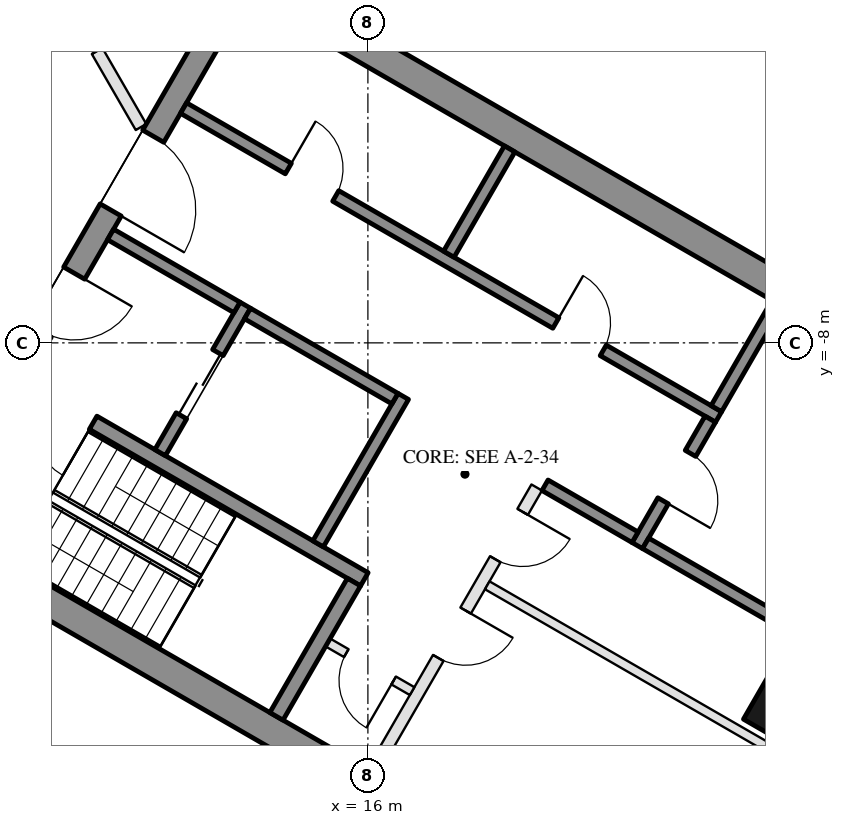
"""IFC4 building model, lengths in metres.
Left out: names, types, materials, properties, quantities, classifications, styles, units other than length and angle.
Written with IfcOpenShell. Run it as: python <this file> out.ifc"""

import sys

from ifc_helpers import new_model, si_unit, direction, frame, frame_2d, origin, origin_2d, place, context, subcontext, project, spatial, rectangle, hollow_rectangle, extrude, element, fill, save


model = new_model("IFC4")
c1 = context("Model", 3, precision=1e-05, world=origin(), true_north=direction((0.0, 1.0)))
c2 = subcontext(c1, "Body", "Model", "MODEL_VIEW")
j1 = project(units=[si_unit("LENGTHUNIT", "METRE"), si_unit("PLANEANGLEUNIT", "RADIAN")], contexts=[c1])
p1 = place(None, origin())
s1 = spatial("IfcSite", under=j1, at=p1, CompositionType="ELEMENT")
p2 = place(p1, origin())
s2 = spatial("IfcBuilding", under=s1, at=p2, CompositionType="ELEMENT")
p3 = place(p2, frame((0.0, 0.0, 150.3)))
s3 = spatial("IfcBuildingStorey", under=s2, at=p3, CompositionType="ELEMENT", Elevation=150.3)
p4 = place(p3, frame((23.729, -13.7, 0.0), z_axis=(0.0, 0.0, 1.0), x_axis=(0.5, 0.866025403784, 0.0)))
e1 = element("IfcColumn", 1, at=p4, inside=s3, PredefinedType="COLUMN", context=c2, shape_type="SweptSolid", body=[
    extrude(hollow_rectangle(XDim=2.4, YDim=2.2, WallThickness=0.06, at=origin_2d()), origin(), (0.0, 0.0, 1.0), 3.7),
])
p5 = place(p3, frame((26.257, -6.567, 0.0), z_axis=(0.0, 0.0, 1.0), x_axis=(-0.500023526245, 0.866011820475, 0.0)))
e2 = element("IfcWall", 2, at=p5, inside=s3, PredefinedType="SOLIDWALL", context=c2, shape_type="SweptSolid", body=[
    extrude(rectangle(XDim=11.816, YDim=0.35, at=frame_2d((5.908, 0.0))), origin(), (0.0, 0.0, 1.0), 3.55),
])
p6 = place(p5, frame((0.38, 0.0, 0.3)))
e3 = element("IfcOpeningElement", 3, at=p6, cuts=e2, PredefinedType="OPENING", context=c2, shape_type="SweptSolid", body=[
    extrude(rectangle(XDim=1.8, YDim=2.65, at=frame_2d((0.9, 1.325))), frame((0.0, 0.185, 0.0), z_axis=(0.0, -1.0, 0.0), x_axis=(1.0, 0.0, 0.0)), (0.0, 0.0, 1.0), 0.37),
])
p7 = place(p5, frame((7.741, 0.0, 0.0)))
e4 = element("IfcOpeningElement", 4, at=p7, cuts=e2, PredefinedType="OPENING", context=c2, shape_type="SweptSolid", body=[
    extrude(rectangle(XDim=2.4, YDim=2.4, at=frame_2d((1.2, 1.2))), frame((0.0, 0.185, 0.0), z_axis=(0.0, -1.0, 0.0), x_axis=(1.0, 0.0, 0.0)), (0.0, 0.0, 1.0), 0.37),
])
p8 = place(p5, frame((3.791, 0.0, 0.3)))
e5 = element("IfcOpeningElement", 5, at=p8, cuts=e2, PredefinedType="OPENING", context=c2, shape_type="SweptSolid", body=[
    extrude(rectangle(XDim=1.6, YDim=2.65, at=frame_2d((0.8, 1.325))), frame((0.0, 0.185, 0.0), z_axis=(0.0, -1.0, 0.0), x_axis=(1.0, 0.0, 0.0)), (0.0, 0.0, 1.0), 0.37),
])
p9 = place(p5, frame((5.691, 0.0, 0.3)))
e6 = element("IfcOpeningElement", 6, at=p9, cuts=e2, PredefinedType="OPENING", context=c2, shape_type="SweptSolid", body=[
    extrude(rectangle(XDim=1.6, YDim=2.65, at=frame_2d((0.8, 1.325))), frame((0.0, 0.185, 0.0), z_axis=(0.0, -1.0, 0.0), x_axis=(1.0, 0.0, 0.0)), (0.0, 0.0, 1.0), 0.37),
])
for number, where, z_axis, x_axis in (
    (7, (8.547, -10.997, 0.0), (0.0, 0.0, 1.0), (0.866, -0.5, 0.0)),
    (8, (13.797, -1.903, 0.0), (0.0, 0.0, 1.0), (0.866, -0.5, 0.0)),
):
    element("IfcWall", number, at=place(p3, frame(where, z_axis=z_axis, x_axis=x_axis)), inside=s3, PredefinedType="SHEAR", context=c2, shape_type="SweptSolid", body=[
        extrude(rectangle(XDim=14.837, YDim=0.5, at=frame_2d((7.418, 0.0))), origin(), (0.0, 0.0, 1.0), 3.5),
    ])
p10 = place(p3, frame((8.845, -10.88, 0.0), z_axis=(0.0, 0.0, 1.0), x_axis=(0.500004234368, 0.866022959057, 0.0)))
e9 = element("IfcWall", 9, at=p10, inside=s3, PredefinedType="SHEAR", context=c2, shape_type="SweptSolid", body=[
    extrude(rectangle(XDim=10.0, YDim=0.4, at=frame_2d((5.0, 0.0))), origin(), (0.0, 0.0, 1.0), 3.5),
])
p11 = place(p10, frame((3.55, 0.0, 0.0)))
e10 = element("IfcOpeningElement", 10, at=p11, cuts=e9, PredefinedType="OPENING", context=c2, shape_type="SweptSolid", body=[
    extrude(rectangle(XDim=1.1, YDim=2.1, at=frame_2d((0.55, 1.05))), frame((0.0, 0.21, 0.0), z_axis=(0.0, -1.0, 0.0), x_axis=(1.0, 0.0, 0.0)), (0.0, 0.0, 1.0), 0.42),
])
p12 = place(p10, frame((5.85, 0.0, 0.0)))
e11 = element("IfcOpeningElement", 11, at=p12, cuts=e9, PredefinedType="OPENING", context=c2, shape_type="SweptSolid", body=[
    extrude(rectangle(XDim=1.4, YDim=2.1, at=frame_2d((0.7, 1.05))), frame((0.0, 0.21, 0.0), z_axis=(0.0, -1.0, 0.0), x_axis=(1.0, 0.0, 0.0)), (0.0, 0.0, 1.0), 0.42),
])
p13 = place(p3, frame((10.356, -8.664, 0.0), z_axis=(0.0, 0.0, 1.0), x_axis=(0.866028629588, -0.499994412703, 0.0)))
e12 = element("IfcWall", 12, at=p13, inside=s3, PredefinedType="SHEAR", context=c2, shape_type="SweptSolid", body=[
    extrude(rectangle(XDim=6.45, YDim=0.25, at=frame_2d((3.225, 0.0))), origin(), (0.0, 0.0, 1.0), 3.5),
])
p14 = place(p13, frame((0.3, 0.0, 0.0)))
e13 = element("IfcOpeningElement", 13, at=p14, cuts=e12, PredefinedType="OPENING", context=c2, shape_type="SweptSolid", body=[
    extrude(rectangle(XDim=1.0, YDim=2.1, at=frame_2d((0.5, 1.05))), frame((0.0, 0.135, 0.0), z_axis=(0.0, -1.0, 0.0), x_axis=(1.0, 0.0, 0.0)), (0.0, 0.0, 1.0), 0.27),
])
p15 = place(p3, frame((14.496, -14.143, 0.0), z_axis=(0.0, 0.0, 1.0), x_axis=(0.500062241894, 0.865989465428, 0.0)))
e14 = element("IfcWall", 14, at=p15, inside=s3, PredefinedType="SHEAR", context=c2, shape_type="SweptSolid", body=[
    extrude(rectangle(XDim=2.55, YDim=0.25, at=frame_2d((1.275, 0.0))), origin(), (0.0, 0.0, 1.0), 3.5),
])
p16 = place(p3, frame((15.181, -11.305, 0.0), z_axis=(0.0, 0.0, 1.0), x_axis=(0.49994636267, 0.866056369097, 0.0)))
e15 = element("IfcWall", 15, at=p16, inside=s3, PredefinedType="SHEAR", context=c2, shape_type="SweptSolid", body=[
    extrude(rectangle(XDim=2.8, YDim=0.2, at=frame_2d((1.4, 0.0))), origin(), (0.0, 0.0, 1.0), 3.5),
])
p17 = place(p3, frame((12.583, -9.805, 0.0), z_axis=(0.0, 0.0, 1.0), x_axis=(0.49994636267, 0.866056369097, 0.0)))
e16 = element("IfcWall", 16, at=p17, inside=s3, PredefinedType="SHEAR", context=c2, shape_type="SweptSolid", body=[
    extrude(rectangle(XDim=2.8, YDim=0.2, at=frame_2d((1.4, 0.0))), origin(), (0.0, 0.0, 1.0), 3.5),
])
p18 = place(p17, frame((0.7, 0.0, 0.0)))
e17 = element("IfcOpeningElement", 17, at=p18, cuts=e16, PredefinedType="OPENING", context=c2, shape_type="SweptSolid", body=[
    extrude(rectangle(XDim=1.2, YDim=2.1, at=frame_2d((0.6, 1.05))), frame((0.0, 0.11, 0.0), z_axis=(0.0, -1.0, 0.0), x_axis=(1.0, 0.0, 0.0)), (0.0, 0.0, 1.0), 0.22),
])
p19 = place(p3, frame((11.768, -6.217, 0.0), z_axis=(0.0, 0.0, 1.0), x_axis=(0.866050077142, -0.499957262057, 0.0)))
e18 = element("IfcWall", 18, at=p19, inside=s3, PredefinedType="SHEAR", context=c2, shape_type="SweptSolid", body=[
    extrude(rectangle(XDim=2.4, YDim=0.2, at=frame_2d((1.2, 0.0))), origin(), (0.0, 0.0, 1.0), 3.5),
])
p20 = place(p3, frame((14.02, -7.517, 0.0), z_axis=(0.0, 0.0, 1.0), x_axis=(0.866034573852, -0.49998411664, 0.0)))
e19 = element("IfcWall", 19, at=p20, inside=s3, PredefinedType="SHEAR", context=c2, shape_type="SweptSolid", body=[
    extrude(rectangle(XDim=2.8, YDim=0.2, at=frame_2d((1.4, 0.0))), origin(), (0.0, 0.0, 1.0), 3.5),
])
p21 = place(p3, frame((12.968, -4.138, 0.0), z_axis=(0.0, 0.0, 1.0), x_axis=(0.866028328073, -0.49999493495, 0.0)))
e20 = element("IfcWall", 20, at=p21, inside=s3, PredefinedType="SHEAR", context=c2, shape_type="SweptSolid", body=[
    extrude(rectangle(XDim=10.16, YDim=0.2, at=frame_2d((5.08, 0.0))), origin(), (0.0, 0.0, 1.0), 3.5),
])
p22 = place(p21, frame((1.99, 0.0, 0.0)))
e21 = element("IfcOpeningElement", 21, at=p22, cuts=e20, PredefinedType="OPENING", context=c2, shape_type="SweptSolid", body=[
    extrude(rectangle(XDim=0.9, YDim=2.1, at=frame_2d((0.45, 1.05))), frame((0.0, 0.11, 0.0), z_axis=(0.0, -1.0, 0.0), x_axis=(1.0, 0.0, 0.0)), (0.0, 0.0, 1.0), 0.22),
])
p23 = place(p21, frame((7.07, 0.0, 0.0)))
e22 = element("IfcOpeningElement", 22, at=p23, cuts=e20, PredefinedType="OPENING", context=c2, shape_type="SweptSolid", body=[
    extrude(rectangle(XDim=0.9, YDim=2.1, at=frame_2d((0.45, 1.05))), frame((0.0, 0.11, 0.0), z_axis=(0.0, -1.0, 0.0), x_axis=(1.0, 0.0, 0.0)), (0.0, 0.0, 1.0), 0.22),
])
p24 = place(p3, frame((20.43, -11.333, 0.0), z_axis=(0.0, 0.0, 1.0), x_axis=(0.500001309137, 0.866024647952, 0.0)))
e23 = element("IfcWall", 23, at=p24, inside=s3, PredefinedType="SHEAR", context=c2, shape_type="SweptSolid", body=[
    extrude(rectangle(XDim=2.4, YDim=0.2, at=frame_2d((1.2, 0.0))), origin(), (0.0, 0.0, 1.0), 3.5),
])
p25 = place(p24, frame((0.85, 0.0, 0.0)))
e24 = element("IfcOpeningElement", 24, at=p25, cuts=e23, PredefinedType="OPENING", context=c2, shape_type="SweptSolid", body=[
    extrude(rectangle(XDim=0.9, YDim=2.1, at=frame_2d((0.45, 1.05))), frame((0.0, 0.11, 0.0), z_axis=(0.0, -1.0, 0.0), x_axis=(1.0, 0.0, 0.0)), (0.0, 0.0, 1.0), 0.22),
])
p26 = place(p3, frame((18.913, -10.342, 0.0), z_axis=(0.0, 0.0, 1.0), x_axis=(0.866038183914, -0.499977863513, 0.0)))
e25 = element("IfcWall", 25, at=p26, inside=s3, PredefinedType="SHEAR", context=c2, shape_type="SweptSolid", body=[
    extrude(rectangle(XDim=1.71, YDim=0.2, at=frame_2d((0.855, 0.0))), origin(), (0.0, 0.0, 1.0), 3.5),
])
for number, where, z_axis, x_axis in (
    (26, (17.331, -6.542, 0.0), (0.0, 0.0, 1.0), (0.5, 0.866, 0.0)),
    (27, (21.73, -9.082, 0.0), (0.0, 0.0, 1.0), (0.5, 0.866, 0.0)),
):
    element("IfcWall", number, at=place(p3, frame(where, z_axis=z_axis, x_axis=x_axis)), inside=s3, PredefinedType="SHEAR", context=c2, shape_type="SweptSolid", body=[
        extrude(rectangle(XDim=2.0, YDim=0.2, at=frame_2d((1.0, 0.0))), origin(), (0.0, 0.0, 1.0), 3.5),
    ])
p27 = place(p3, frame((20.567, -11.297, 0.0), z_axis=(0.0, 0.0, 1.0), x_axis=(0.866055327414, -0.49994816717, 0.0)))
e28 = element("IfcWall", 28, at=p27, inside=s3, PredefinedType="SHEAR", context=c2, shape_type="SweptSolid", body=[
    extrude(rectangle(XDim=2.84, YDim=0.2, at=frame_2d((1.42, 0.0))), origin(), (0.0, 0.0, 1.0), 3.5),
])
p28 = place(p3, frame((16.076, -15.055, 0.0), z_axis=(0.0, 0.0, 1.0), x_axis=(0.499995103361, 0.866028230842, 0.0)))
e29 = element("IfcWall", 29, at=p28, inside=s3, PredefinedType="PARTITIONING", context=c2, shape_type="SweptSolid", body=[
    extrude(rectangle(XDim=5.4, YDim=0.2, at=frame_2d((2.7, 0.0))), origin(), (0.0, 0.0, 1.0), 3.5),
])
p29 = place(p28, frame((2.163, 0.0, 0.0)))
e30 = element("IfcOpeningElement", 30, at=p29, cuts=e29, PredefinedType="OPENING", context=c2, shape_type="SweptSolid", body=[
    extrude(rectangle(XDim=0.9, YDim=2.1, at=frame_2d((0.45, 1.05))), frame((0.0, 0.11, 0.0), z_axis=(0.0, -1.0, 0.0), x_axis=(1.0, 0.0, 0.0)), (0.0, 0.0, 1.0), 0.22),
])
p30 = place(p28, frame((4.038, 0.0, 0.0)))
e31 = element("IfcOpeningElement", 31, at=p30, cuts=e29, PredefinedType="OPENING", context=c2, shape_type="SweptSolid", body=[
    extrude(rectangle(XDim=0.9, YDim=2.1, at=frame_2d((0.45, 1.05))), frame((0.0, 0.11, 0.0), z_axis=(0.0, -1.0, 0.0), x_axis=(1.0, 0.0, 0.0)), (0.0, 0.0, 1.0), 0.22),
])
p31 = place(p3, frame((15.342, -12.928, 0.0), z_axis=(0.0, 0.0, 1.0), x_axis=(0.865989903783, -0.500061482766, 0.0)))
e32 = element("IfcWall", 32, at=p31, inside=s3, PredefinedType="PARTITIONING", context=c2, shape_type="SweptSolid", body=[
    extrude(rectangle(XDim=1.6, YDim=0.15, at=frame_2d((0.8, 0.0))), origin(), (0.0, 0.0, 1.0), 3.5),
])
p32 = place(p31, frame((0.35, 0.0, 0.0)))
e33 = element("IfcOpeningElement", 33, at=p32, cuts=e32, PredefinedType="OPENING", context=c2, shape_type="SweptSolid", body=[
    extrude(rectangle(XDim=0.9, YDim=2.1, at=frame_2d((0.45, 1.05))), frame((0.0, 0.085, 0.0), z_axis=(0.0, -1.0, 0.0), x_axis=(1.0, 0.0, 0.0)), (0.0, 0.0, 1.0), 0.17),
])
p33 = place(p3, frame((17.963, -11.987, 0.0), z_axis=(0.0, 0.0, 1.0), x_axis=(0.866016523273, -0.500015381182, 0.0)))
e34 = element("IfcWall", 34, at=p33, inside=s3, PredefinedType="PARTITIONING", context=c2, shape_type="SweptSolid", body=[
    extrude(rectangle(XDim=6.95, YDim=0.15, at=frame_2d((3.475, 0.0))), origin(), (0.0, 0.0, 1.0), 3.5),
])
p34 = place(p3, frame((10.325, -1.083, 0.0), z_axis=(0.0, 0.0, 1.0), x_axis=(0.500008716408, -0.866020371305, 0.0)))
e35 = element("IfcWall", 35, at=p34, inside=s3, PredefinedType="PARTITIONING", context=c2, shape_type="SweptSolid", body=[
    extrude(rectangle(XDim=3.888, YDim=0.2, at=frame_2d((1.944, 0.0))), origin(), (0.0, 0.0, 1.0), 2.95),
])
p35 = place(p34, frame((1.444, 0.0, 0.0)))
e36 = element("IfcOpeningElement", 36, at=p35, cuts=e35, PredefinedType="OPENING", context=c2, shape_type="SweptSolid", body=[
    extrude(rectangle(XDim=1.0, YDim=2.1, at=frame_2d((0.5, 1.05))), frame((0.0, 0.11, 0.0), z_axis=(0.0, -1.0, 0.0), x_axis=(1.0, 0.0, 0.0)), (0.0, 0.0, 1.0), 0.22),
])
p36 = place(p18, origin())
e37 = element("IfcDoor", 37, at=p36, inside=s3, OperationType="DOUBLE_DOOR_SLIDING", PredefinedType="DOOR", context=c2, shape_type="SweptSolid", body=[
    extrude(rectangle(XDim=1.2, YDim=2.1, at=frame_2d((0.6, 1.05))), frame((0.0, 0.025, 0.0), z_axis=(0.0, -1.0, 0.0), x_axis=(1.0, 0.0, 0.0)), (0.0, 0.0, 1.0), 0.05),
])
fill(e17, e37)
p37 = place(p32, frame((0.9, 0.0, 0.0), z_axis=(0.0, 0.0, 1.0), x_axis=(-1.0, 0.0, 0.0)))
e38 = element("IfcDoor", 38, at=p37, inside=s3, OperationType="SINGLE_SWING_LEFT", PredefinedType="DOOR", context=c2, shape_type="SweptSolid", body=[
    extrude(rectangle(XDim=0.9, YDim=2.1, at=frame_2d((0.45, 1.05))), frame((0.0, 0.025, 0.0), z_axis=(0.0, -1.0, 0.0), x_axis=(1.0, 0.0, 0.0)), (0.0, 0.0, 1.0), 0.05),
])
fill(e33, e38)
p38 = place(p22, origin())
e39 = element("IfcDoor", 39, at=p38, inside=s3, OperationType="SINGLE_SWING_LEFT", PredefinedType="DOOR", context=c2, shape_type="SweptSolid", body=[
    extrude(rectangle(XDim=0.9, YDim=2.1, at=frame_2d((0.45, 1.05))), frame((0.0, 0.025, 0.0), z_axis=(0.0, -1.0, 0.0), x_axis=(1.0, 0.0, 0.0)), (0.0, 0.0, 1.0), 0.05),
])
fill(e21, e39)
p39 = place(p23, origin())
e40 = element("IfcDoor", 40, at=p39, inside=s3, OperationType="SINGLE_SWING_LEFT", PredefinedType="DOOR", context=c2, shape_type="SweptSolid", body=[
    extrude(rectangle(XDim=0.9, YDim=2.1, at=frame_2d((0.45, 1.05))), frame((0.0, 0.025, 0.0), z_axis=(0.0, -1.0, 0.0), x_axis=(1.0, 0.0, 0.0)), (0.0, 0.0, 1.0), 0.05),
])
fill(e22, e40)
p40 = place(p25, frame((0.9, 0.0, 0.0), z_axis=(0.0, 0.0, 1.0), x_axis=(-1.0, 0.0, 0.0)))
e41 = element("IfcDoor", 41, at=p40, inside=s3, OperationType="SINGLE_SWING_RIGHT", PredefinedType="DOOR", context=c2, shape_type="SweptSolid", body=[
    extrude(rectangle(XDim=0.9, YDim=2.1, at=frame_2d((0.45, 1.05))), frame((0.0, 0.025, 0.0), z_axis=(0.0, -1.0, 0.0), x_axis=(1.0, 0.0, 0.0)), (0.0, 0.0, 1.0), 0.05),
])
fill(e24, e41)
p41 = place(p29, frame((0.9, 0.0, 0.0), z_axis=(0.0, 0.0, 1.0), x_axis=(-1.0, 0.0, 0.0)))
e42 = element("IfcDoor", 42, at=p41, inside=s3, OperationType="SINGLE_SWING_LEFT", PredefinedType="DOOR", context=c2, shape_type="SweptSolid", body=[
    extrude(rectangle(XDim=0.9, YDim=2.1, at=frame_2d((0.45, 1.05))), frame((0.0, 0.025, 0.0), z_axis=(0.0, -1.0, 0.0), x_axis=(1.0, 0.0, 0.0)), (0.0, 0.0, 1.0), 0.05),
])
fill(e30, e42)
p42 = place(p30, frame((0.9, 0.0, 0.0), z_axis=(0.0, 0.0, 1.0), x_axis=(-1.0, 0.0, 0.0)))
e43 = element("IfcDoor", 43, at=p42, inside=s3, OperationType="SINGLE_SWING_LEFT", PredefinedType="DOOR", context=c2, shape_type="SweptSolid", body=[
    extrude(rectangle(XDim=0.9, YDim=2.1, at=frame_2d((0.45, 1.05))), frame((0.0, 0.025, 0.0), z_axis=(0.0, -1.0, 0.0), x_axis=(1.0, 0.0, 0.0)), (0.0, 0.0, 1.0), 0.05),
])
fill(e31, e43)
p43 = place(p11, frame((1.1, 0.0, 0.0), z_axis=(0.0, 0.0, 1.0), x_axis=(-1.0, 0.0, 0.0)))
e44 = element("IfcDoor", 44, at=p43, inside=s3, OperationType="SINGLE_SWING_LEFT", PredefinedType="DOOR", context=c2, shape_type="SweptSolid", body=[
    extrude(rectangle(XDim=1.1, YDim=2.1, at=frame_2d((0.55, 1.05))), frame((0.0, 0.025, 0.0), z_axis=(0.0, -1.0, 0.0), x_axis=(1.0, 0.0, 0.0)), (0.0, 0.0, 1.0), 0.05),
])
fill(e10, e44)
p44 = place(p12, frame((1.4, 0.0, 0.0), z_axis=(0.0, 0.0, 1.0), x_axis=(-1.0, 0.0, 0.0)))
e45 = element("IfcDoor", 45, at=p44, inside=s3, OperationType="DOUBLE_DOOR_SINGLE_SWING", PredefinedType="DOOR", context=c2, shape_type="SweptSolid", body=[
    extrude(rectangle(XDim=1.4, YDim=2.1, at=frame_2d((0.7, 1.05))), frame((0.0, 0.025, 0.0), z_axis=(0.0, -1.0, 0.0), x_axis=(1.0, 0.0, 0.0)), (0.0, 0.0, 1.0), 0.05),
])
fill(e11, e45)
p45 = place(p14, frame((1.0, 0.0, 0.0), z_axis=(0.0, 0.0, 1.0), x_axis=(-1.0, 0.0, 0.0)))
e46 = element("IfcDoor", 46, at=p45, inside=s3, OperationType="SINGLE_SWING_LEFT", PredefinedType="DOOR", context=c2, shape_type="SweptSolid", body=[
    extrude(rectangle(XDim=1.0, YDim=2.1, at=frame_2d((0.5, 1.05))), frame((0.0, 0.025, 0.0), z_axis=(0.0, -1.0, 0.0), x_axis=(1.0, 0.0, 0.0)), (0.0, 0.0, 1.0), 0.05),
])
fill(e13, e46)
save(model, sys.argv[1])
